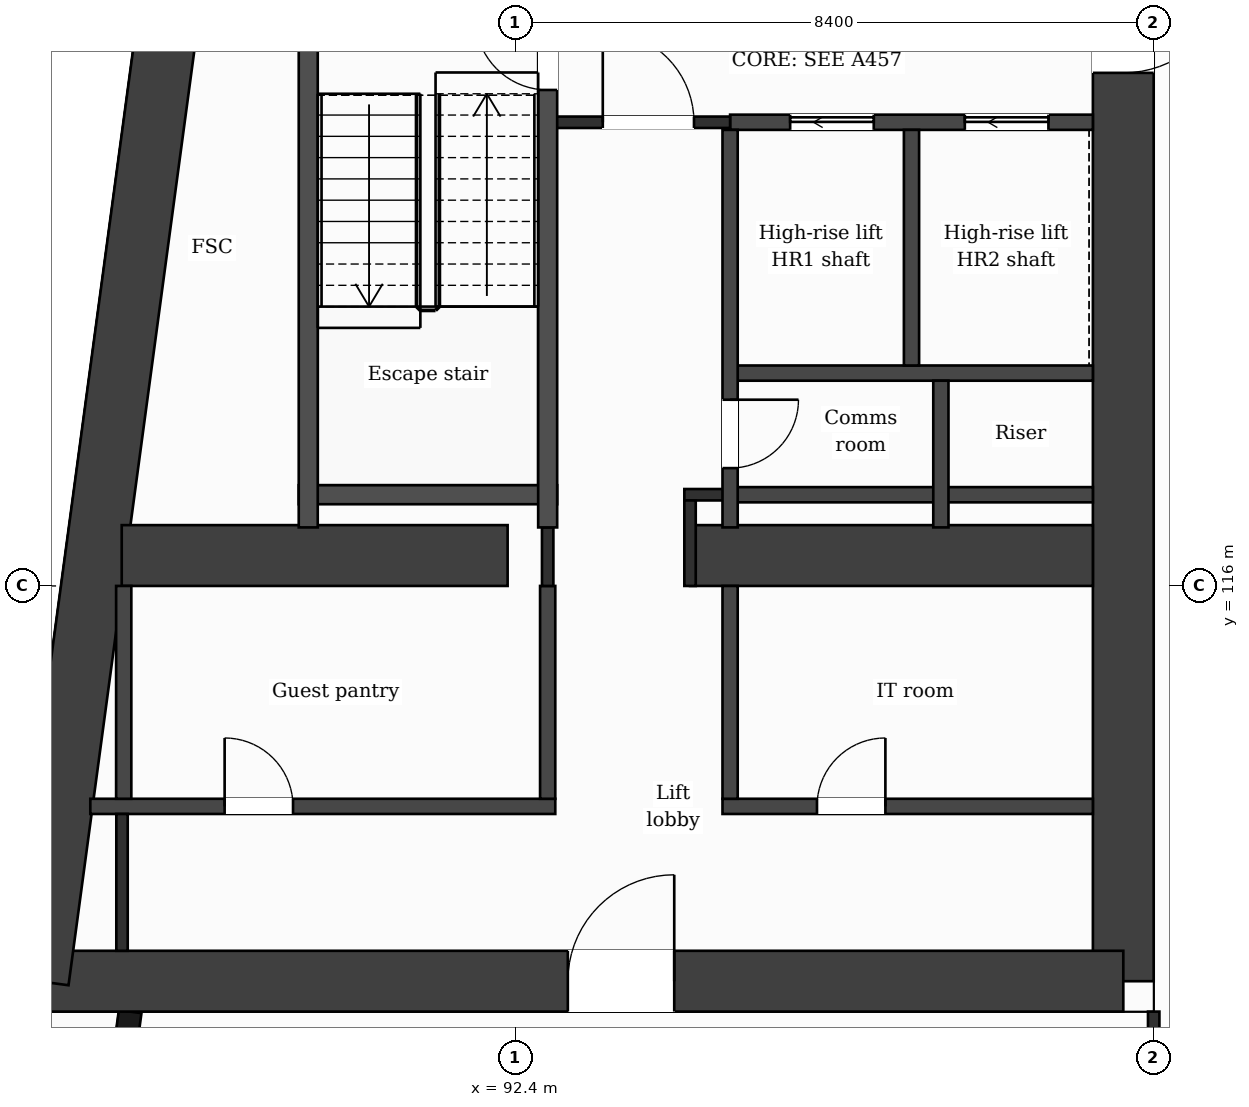
"""IFC4 building model, lengths in metres.
Left out: names, types, materials, properties, quantities, classifications, styles, units other than length and angle.
Written with IfcOpenShell. Run it as: python <this file> out.ifc"""

import sys

from ifc_helpers import new_model, si_unit, direction, frame, frame_2d, origin, place, context, subcontext, project, spatial, rectangle, extrude, element, fill, save


model = new_model("IFC4")
c1 = context("Model", 3, precision=1e-05, world=origin(), true_north=direction((0.0, 1.0)))
c2 = subcontext(c1, "Body", "Model", "MODEL_VIEW")
j1 = project(units=[si_unit("LENGTHUNIT", "METRE"), si_unit("PLANEANGLEUNIT", "RADIAN")], contexts=[c1])
p1 = place(None, origin())
s1 = spatial("IfcSite", under=j1, at=p1, CompositionType="ELEMENT")
p2 = place(p1, origin())
s2 = spatial("IfcBuilding", under=s1, at=p2, CompositionType="ELEMENT")
p3 = place(p2, frame((0.0, 0.0, 231.8)))
s3 = spatial("IfcBuildingStorey", under=s2, at=p3, CompositionType="ELEMENT", Elevation=231.8)
p4 = place(p3, frame((100.4, 132.0, 0.0), z_axis=(0.0, 0.0, 1.0), x_axis=(0.0, -1.0, 0.0)))
e1 = element("IfcWall", 1, at=p4, inside=s3, PredefinedType="SHEAR", context=c2, shape_type="SweptSolid", body=[
    extrude(rectangle(XDim=21.2, YDim=0.8, at=frame_2d((10.6, 0.0))), origin(), (0.0, 0.0, 1.0), 3.7),
])
p5 = place(p4, frame((7.85, 0.0, 0.0)))
e2 = element("IfcOpeningElement", 2, at=p5, cuts=e1, PredefinedType="OPENING", context=c2, shape_type="SweptSolid", body=[
    extrude(rectangle(XDim=1.4, YDim=2.1, at=frame_2d((0.7, 1.05))), frame((0.0, 0.41, 0.0), z_axis=(0.0, -1.0, 0.0), x_axis=(1.0, 0.0, 0.0)), (0.0, 0.0, 1.0), 0.82),
])
p6 = place(p3, frame((100.4, 110.8, 0.0), z_axis=(0.0, 0.0, 1.0), x_axis=(-1.0, 0.0, 0.0)))
e3 = element("IfcWall", 3, at=p6, inside=s3, PredefinedType="SHEAR", context=c2, shape_type="SweptSolid", body=[
    extrude(rectangle(XDim=14.273, YDim=0.8, at=frame_2d((7.137, 0.0))), origin(), (0.0, 0.0, 1.0), 3.7),
])
p7 = place(p6, frame((5.908, 0.0, 0.0)))
e4 = element("IfcOpeningElement", 4, at=p7, cuts=e3, PredefinedType="OPENING", context=c2, shape_type="SweptSolid", body=[
    extrude(rectangle(XDim=1.4, YDim=2.1, at=frame_2d((0.7, 1.05))), frame((0.0, 0.41, 0.0), z_axis=(0.0, -1.0, 0.0), x_axis=(1.0, 0.0, 0.0)), (0.0, 0.0, 1.0), 0.82),
])
p8 = place(p3, frame((86.127, 110.8, 0.0), z_axis=(0.0, 0.0, 1.0), x_axis=(0.133408347329, 0.991061154956, 0.0)))
e5 = element("IfcWall", 5, at=p8, inside=s3, PredefinedType="SHEAR", context=c2, shape_type="SweptSolid", body=[
    extrude(rectangle(XDim=21.391, YDim=0.8, at=frame_2d((10.696, 0.0))), origin(), (0.0, 0.0, 1.0), 3.7),
])
p9 = place(p3, frame((87.223, 116.4, 0.0), z_axis=(0.0, 0.0, 1.0), x_axis=(1.0, 0.0, 0.0)))
e6 = element("IfcWall", 6, at=p9, inside=s3, PredefinedType="SHEAR", context=c2, shape_type="SweptSolid", body=[
    extrude(rectangle(XDim=5.077, YDim=0.8, at=frame_2d((2.539, 0.0))), origin(), (0.0, 0.0, 1.0), 3.7),
])
p10 = place(p3, frame((94.7, 116.4, 0.0), z_axis=(0.0, 0.0, 1.0), x_axis=(1.0, 0.0, 0.0)))
e7 = element("IfcWall", 7, at=p10, inside=s3, PredefinedType="SHEAR", context=c2, shape_type="SweptSolid", body=[
    extrude(rectangle(XDim=5.3, YDim=0.8, at=frame_2d((2.65, 0.0))), origin(), (0.0, 0.0, 1.0), 3.7),
])
p11 = place(p3, frame((87.334, 110.4, 0.0), z_axis=(0.0, 0.0, 1.0), x_axis=(-0.133437175554, -0.991057273915, 0.0)))
e8 = element("IfcWall", 8, at=p11, inside=s3, PredefinedType="SOLIDWALL", context=c2, shape_type="SweptSolid", body=[
    extrude(rectangle(XDim=6.781, YDim=0.3, at=frame_2d((3.39, 0.0))), origin(), (0.0, 0.0, 1.0), 3.38),
])
p12 = place(p11, frame((1.418, 0.0, 0.0)))
e9 = element("IfcOpeningElement", 9, at=p12, cuts=e8, PredefinedType="OPENING", context=c2, shape_type="SweptSolid", body=[
    extrude(rectangle(XDim=1.2, YDim=2.4, at=frame_2d((0.6, 1.2))), frame((0.0, 0.16, 0.0), z_axis=(0.0, -1.0, 0.0), x_axis=(1.0, 0.0, 0.0)), (0.0, 0.0, 1.0), 0.32),
])
p13 = place(p11, frame((4.758, 0.0, 0.9)))
e10 = element("IfcOpeningElement", 10, at=p13, cuts=e8, PredefinedType="OPENING", context=c2, shape_type="SweptSolid", body=[
    extrude(rectangle(XDim=1.2, YDim=2.1, at=frame_2d((0.6, 1.05))), frame((0.0, 0.16, 0.0), z_axis=(0.0, -1.0, 0.0), x_axis=(1.0, 0.0, 0.0)), (0.0, 0.0, 1.0), 0.32),
])
p14 = place(p3, frame((86.81, 113.1, 0.0), z_axis=(0.0, 0.0, 1.0), x_axis=(1.0, 0.0, 0.0)))
e11 = element("IfcWall", 11, at=p14, inside=s3, PredefinedType="PARTITIONING", context=c2, shape_type="SweptSolid", body=[
    extrude(rectangle(XDim=6.117, YDim=0.2, at=frame_2d((3.059, 0.0))), origin(), (0.0, 0.0, 1.0), 3.38),
])
p15 = place(p14, frame((1.767, 0.0, 0.0)))
e12 = element("IfcOpeningElement", 12, at=p15, cuts=e11, PredefinedType="OPENING", context=c2, shape_type="SweptSolid", body=[
    extrude(rectangle(XDim=0.9, YDim=2.1, at=frame_2d((0.45, 1.05))), frame((0.0, 0.11, 0.0), z_axis=(0.0, -1.0, 0.0), x_axis=(1.0, 0.0, 0.0)), (0.0, 0.0, 1.0), 0.22),
])
p16 = place(p3, frame((95.127, 113.1, 0.0), z_axis=(0.0, 0.0, 1.0), x_axis=(1.0, 0.0, 0.0)))
e13 = element("IfcWall", 13, at=p16, inside=s3, PredefinedType="PARTITIONING", context=c2, shape_type="SweptSolid", body=[
    extrude(rectangle(XDim=4.873, YDim=0.2, at=frame_2d((2.437, 0.0))), origin(), (0.0, 0.0, 1.0), 3.38),
])
p17 = place(p16, frame((1.243, 0.0, 0.0)))
e14 = element("IfcOpeningElement", 14, at=p17, cuts=e13, PredefinedType="OPENING", context=c2, shape_type="SweptSolid", body=[
    extrude(rectangle(XDim=0.9, YDim=2.1, at=frame_2d((0.45, 1.05))), frame((0.0, 0.11, 0.0), z_axis=(0.0, -1.0, 0.0), x_axis=(1.0, 0.0, 0.0)), (0.0, 0.0, 1.0), 0.22),
])
p18 = place(p3, frame((95.227, 117.2, 0.0), z_axis=(0.0, 0.0, 1.0), x_axis=(1.0, 0.0, 0.0)))
e15 = element("IfcWall", 15, at=p18, inside=s3, PredefinedType="PARTITIONING", context=c2, shape_type="SweptSolid", body=[
    extrude(rectangle(XDim=4.773, YDim=0.2, at=frame_2d((2.386, 0.0))), origin(), (0.0, 0.0, 1.0), 3.38),
])
p19 = place(p3, frame((94.625, 117.2, 0.0), z_axis=(0.0, 0.0, 1.0), x_axis=(1.0, 0.0, 0.0)))
e16 = element("IfcWall", 16, at=p19, inside=s3, PredefinedType="PARTITIONING", context=c2, shape_type="SweptSolid", body=[
    extrude(rectangle(XDim=0.602, YDim=0.15, at=frame_2d((0.301, 0.0))), origin(), (0.0, 0.0, 1.0), 3.38),
])
p20 = place(p3, frame((89.552, 117.2, 0.0), z_axis=(0.0, 0.0, 1.0), x_axis=(1.0, 0.0, 0.0)))
e17 = element("IfcWall", 17, at=p20, inside=s3, PredefinedType="PARTITIONING", context=c2, shape_type="SweptSolid", body=[
    extrude(rectangle(XDim=3.4, YDim=0.25, at=frame_2d((1.7, 0.0))), origin(), (0.0, 0.0, 1.0), 3.38),
])
p21 = place(p3, frame((95.227, 118.8, 0.0), z_axis=(0.0, 0.0, 1.0), x_axis=(1.0, 0.0, 0.0)))
e18 = element("IfcWall", 18, at=p21, inside=s3, PredefinedType="PARTITIONING", context=c2, shape_type="SweptSolid", body=[
    extrude(rectangle(XDim=4.773, YDim=0.2, at=frame_2d((2.386, 0.0))), origin(), (0.0, 0.0, 1.0), 3.38),
])
p22 = place(p3, frame((95.227, 122.1, 0.0), z_axis=(0.0, 0.0, 1.0), x_axis=(1.0, 0.0, 0.0)))
e19 = element("IfcWall", 19, at=p22, inside=s3, PredefinedType="PARTITIONING", context=c2, shape_type="SweptSolid", body=[
    extrude(rectangle(XDim=4.773, YDim=0.2, at=frame_2d((2.386, 0.0))), origin(), (0.0, 0.0, 1.0), 3.38),
])
p23 = place(p22, frame((0.79, 0.0, 0.0)))
e20 = element("IfcOpeningElement", 20, at=p23, cuts=e19, PredefinedType="OPENING", context=c2, shape_type="SweptSolid", body=[
    extrude(rectangle(XDim=1.1, YDim=2.1, at=frame_2d((0.55, 1.05))), frame((0.0, 0.11, 0.0), z_axis=(0.0, -1.0, 0.0), x_axis=(1.0, 0.0, 0.0)), (0.0, 0.0, 1.0), 0.22),
])
p24 = place(p22, frame((3.088, 0.0, 0.0)))
e21 = element("IfcOpeningElement", 21, at=p24, cuts=e19, PredefinedType="OPENING", context=c2, shape_type="SweptSolid", body=[
    extrude(rectangle(XDim=1.1, YDim=2.1, at=frame_2d((0.55, 1.05))), frame((0.0, 0.11, 0.0), z_axis=(0.0, -1.0, 0.0), x_axis=(1.0, 0.0, 0.0)), (0.0, 0.0, 1.0), 0.22),
])
p25 = place(p3, frame((92.827, 122.1, 0.0), z_axis=(0.0, 0.0, 1.0), x_axis=(1.0, 0.0, 0.0)))
e22 = element("IfcWall", 22, at=p25, inside=s3, PredefinedType="PARTITIONING", context=c2, shape_type="SweptSolid", body=[
    extrude(rectangle(XDim=2.4, YDim=0.15, at=frame_2d((1.2, 0.0))), origin(), (0.0, 0.0, 1.0), 3.38),
])
p26 = place(p25, frame((0.725, 0.0, 0.0)))
e23 = element("IfcOpeningElement", 23, at=p26, cuts=e22, PredefinedType="OPENING", context=c2, shape_type="SweptSolid", body=[
    extrude(rectangle(XDim=1.2, YDim=2.1, at=frame_2d((0.6, 1.05))), frame((0.0, 0.085, 0.0), z_axis=(0.0, -1.0, 0.0), x_axis=(1.0, 0.0, 0.0)), (0.0, 0.0, 1.0), 0.17),
])
p27 = place(p3, frame((87.25, 113.2, 0.0), z_axis=(0.0, 0.0, 1.0), x_axis=(0.0, 1.0, 0.0)))
e24 = element("IfcWall", 24, at=p27, inside=s3, PredefinedType="PARTITIONING", context=c2, shape_type="SweptSolid", body=[
    extrude(rectangle(XDim=2.8, YDim=0.2, at=frame_2d((1.4, 0.0))), origin(), (0.0, 0.0, 1.0), 3.38),
])
p28 = place(p3, frame((87.227, 111.2, 0.0), z_axis=(0.0, 0.0, 1.0), x_axis=(0.0, 1.0, 0.0)))
e25 = element("IfcWall", 25, at=p28, inside=s3, PredefinedType="PARTITIONING", context=c2, shape_type="SweptSolid", body=[
    extrude(rectangle(XDim=1.8, YDim=0.15, at=frame_2d((0.9, 0.0))), origin(), (0.0, 0.0, 1.0), 3.38),
])
p29 = place(p3, frame((89.677, 116.77, 0.0), z_axis=(0.0, 0.0, 1.0), x_axis=(0.0, 1.0, 0.0)))
e26 = element("IfcWall", 26, at=p29, inside=s3, PredefinedType="PARTITIONING", context=c2, shape_type="SweptSolid", body=[
    extrude(rectangle(XDim=7.055, YDim=0.25, at=frame_2d((3.527, 0.0))), origin(), (0.0, 0.0, 1.0), 3.38),
])
p30 = place(p3, frame((92.827, 113.2, 0.0), z_axis=(0.0, 0.0, 1.0), x_axis=(0.0, 1.0, 0.0)))
e27 = element("IfcWall", 27, at=p30, inside=s3, PredefinedType="PARTITIONING", context=c2, shape_type="SweptSolid", body=[
    extrude(rectangle(XDim=2.8, YDim=0.2, at=frame_2d((1.4, 0.0))), origin(), (0.0, 0.0, 1.0), 3.38),
])
p31 = place(p3, frame((92.827, 116.0, 0.0), z_axis=(0.0, 0.0, 1.0), x_axis=(0.0, 1.0, 0.0)))
e28 = element("IfcWall", 28, at=p31, inside=s3, PredefinedType="PARTITIONING", context=c2, shape_type="SweptSolid", body=[
    extrude(rectangle(XDim=0.77, YDim=0.15, at=frame_2d((0.385, 0.0))), origin(), (0.0, 0.0, 1.0), 3.38),
])
p32 = place(p3, frame((92.827, 116.77, 0.0), z_axis=(0.0, 0.0, 1.0), x_axis=(0.0, 1.0, 0.0)))
e29 = element("IfcWall", 29, at=p32, inside=s3, PredefinedType="PARTITIONING", context=c2, shape_type="SweptSolid", body=[
    extrude(rectangle(XDim=7.055, YDim=0.25, at=frame_2d((3.527, 0.0))), origin(), (0.0, 0.0, 1.0), 3.38),
])
p33 = place(p32, frame((5.755, 0.0, 0.0)))
e30 = element("IfcOpeningElement", 30, at=p33, cuts=e29, PredefinedType="OPENING", context=c2, shape_type="SweptSolid", body=[
    extrude(rectangle(XDim=0.95, YDim=2.1, at=frame_2d((0.475, 1.05))), frame((0.0, 0.135, 0.0), z_axis=(0.0, -1.0, 0.0), x_axis=(1.0, 0.0, 0.0)), (0.0, 0.0, 1.0), 0.27),
])
p34 = place(p3, frame((94.7, 116.0, 0.0), z_axis=(0.0, 0.0, 1.0), x_axis=(0.0, 1.0, 0.0)))
e31 = element("IfcWall", 31, at=p34, inside=s3, PredefinedType="PARTITIONING", context=c2, shape_type="SweptSolid", body=[
    extrude(rectangle(XDim=1.125, YDim=0.15, at=frame_2d((0.562, 0.0))), origin(), (0.0, 0.0, 1.0), 3.38),
])
p35 = place(p3, frame((95.227, 113.2, 0.0), z_axis=(0.0, 0.0, 1.0), x_axis=(0.0, 1.0, 0.0)))
e32 = element("IfcWall", 32, at=p35, inside=s3, PredefinedType="PARTITIONING", context=c2, shape_type="SweptSolid", body=[
    extrude(rectangle(XDim=2.8, YDim=0.2, at=frame_2d((1.4, 0.0))), origin(), (0.0, 0.0, 1.0), 3.38),
])
p36 = place(p3, frame((95.227, 116.77, 0.0), z_axis=(0.0, 0.0, 1.0), x_axis=(0.0, 1.0, 0.0)))
e33 = element("IfcWall", 33, at=p36, inside=s3, PredefinedType="PARTITIONING", context=c2, shape_type="SweptSolid", body=[
    extrude(rectangle(XDim=5.23, YDim=0.2, at=frame_2d((2.615, 0.0))), origin(), (0.0, 0.0, 1.0), 3.38),
])
p37 = place(p36, frame((0.78, 0.0, 0.0)))
e34 = element("IfcOpeningElement", 34, at=p37, cuts=e33, PredefinedType="OPENING", context=c2, shape_type="SweptSolid", body=[
    extrude(rectangle(XDim=0.9, YDim=2.1, at=frame_2d((0.45, 1.05))), frame((0.0, 0.11, 0.0), z_axis=(0.0, -1.0, 0.0), x_axis=(1.0, 0.0, 0.0)), (0.0, 0.0, 1.0), 0.22),
])
p38 = place(p3, frame((97.614, 118.9, 0.0), z_axis=(0.0, 0.0, 1.0), x_axis=(0.0, 1.0, 0.0)))
e35 = element("IfcWall", 35, at=p38, inside=s3, PredefinedType="PARTITIONING", context=c2, shape_type="SweptSolid", body=[
    extrude(rectangle(XDim=3.1, YDim=0.2, at=frame_2d((1.55, 0.0))), origin(), (0.0, 0.0, 1.0), 3.38),
])
p39 = place(p3, frame((98.0, 116.77, 0.0), z_axis=(0.0, 0.0, 1.0), x_axis=(0.0, 1.0, 0.0)))
e36 = element("IfcWall", 36, at=p39, inside=s3, PredefinedType="PARTITIONING", context=c2, shape_type="SweptSolid", body=[
    extrude(rectangle(XDim=1.93, YDim=0.2, at=frame_2d((0.965, 0.0))), origin(), (0.0, 0.0, 1.0), 3.38),
])
p40 = place(p3, frame((100.8, 109.075, 0.0), z_axis=(0.0, 0.0, 1.0), x_axis=(0.0, 1.0, 0.0)))
e37 = element("IfcWall", 37, at=p40, inside=s3, PredefinedType="PARTITIONING", context=c2, shape_type="SweptSolid", body=[
    extrude(rectangle(XDim=1.325, YDim=0.15, at=frame_2d((0.663, 0.0))), origin(), (0.0, 0.0, 1.0), 3.38),
])
p41 = place(p26, origin())
e38 = element("IfcDoor", 38, at=p41, inside=s3, OperationType="SINGLE_SWING_LEFT", PredefinedType="DOOR", context=c2, shape_type="SweptSolid", body=[
    extrude(rectangle(XDim=1.2, YDim=2.1, at=frame_2d((0.6, 1.05))), frame((0.0, 0.025, 0.0), z_axis=(0.0, -1.0, 0.0), x_axis=(1.0, 0.0, 0.0)), (0.0, 0.0, 1.0), 0.05),
])
fill(e23, e38)
p42 = place(p23, origin())
e39 = element("IfcDoor", 39, at=p42, inside=s3, OperationType="SLIDING_TO_LEFT", PredefinedType="DOOR", context=c2, shape_type="SweptSolid", body=[
    extrude(rectangle(XDim=1.1, YDim=2.1, at=frame_2d((0.55, 1.05))), frame((0.0, 0.025, 0.0), z_axis=(0.0, -1.0, 0.0), x_axis=(1.0, 0.0, 0.0)), (0.0, 0.0, 1.0), 0.05),
])
fill(e20, e39)
p43 = place(p24, origin())
e40 = element("IfcDoor", 40, at=p43, inside=s3, OperationType="SLIDING_TO_LEFT", PredefinedType="DOOR", context=c2, shape_type="SweptSolid", body=[
    extrude(rectangle(XDim=1.1, YDim=2.1, at=frame_2d((0.55, 1.05))), frame((0.0, 0.025, 0.0), z_axis=(0.0, -1.0, 0.0), x_axis=(1.0, 0.0, 0.0)), (0.0, 0.0, 1.0), 0.05),
])
fill(e21, e40)
p44 = place(p33, origin())
e41 = element("IfcDoor", 41, at=p44, inside=s3, OperationType="SINGLE_SWING_RIGHT", PredefinedType="DOOR", context=c2, shape_type="SweptSolid", body=[
    extrude(rectangle(XDim=0.95, YDim=2.1, at=frame_2d((0.475, 1.05))), frame((0.0, 0.025, 0.0), z_axis=(0.0, -1.0, 0.0), x_axis=(1.0, 0.0, 0.0)), (0.0, 0.0, 1.0), 0.05),
])
fill(e30, e41)
p45 = place(p37, origin())
e42 = element("IfcDoor", 42, at=p45, inside=s3, OperationType="SINGLE_SWING_RIGHT", PredefinedType="DOOR", context=c2, shape_type="SweptSolid", body=[
    extrude(rectangle(XDim=0.9, YDim=2.1, at=frame_2d((0.45, 1.05))), frame((0.0, 0.025, 0.0), z_axis=(0.0, -1.0, 0.0), x_axis=(1.0, 0.0, 0.0)), (0.0, 0.0, 1.0), 0.05),
])
fill(e34, e42)
p46 = place(p15, origin())
e43 = element("IfcDoor", 43, at=p46, inside=s3, OperationType="SINGLE_SWING_LEFT", PredefinedType="DOOR", context=c2, shape_type="SweptSolid", body=[
    extrude(rectangle(XDim=0.9, YDim=2.1, at=frame_2d((0.45, 1.05))), frame((0.0, 0.025, 0.0), z_axis=(0.0, -1.0, 0.0), x_axis=(1.0, 0.0, 0.0)), (0.0, 0.0, 1.0), 0.05),
])
fill(e12, e43)
p47 = place(p17, origin())
e44 = element("IfcDoor", 44, at=p47, inside=s3, OperationType="SINGLE_SWING_RIGHT", PredefinedType="DOOR", context=c2, shape_type="SweptSolid", body=[
    extrude(rectangle(XDim=0.9, YDim=2.1, at=frame_2d((0.45, 1.05))), frame((0.0, 0.025, 0.0), z_axis=(0.0, -1.0, 0.0), x_axis=(1.0, 0.0, 0.0)), (0.0, 0.0, 1.0), 0.05),
])
fill(e14, e44)
p48 = place(p7, origin())
e45 = element("IfcDoor", 45, at=p48, inside=s3, OperationType="SINGLE_SWING_LEFT", PredefinedType="DOOR", context=c2, shape_type="SweptSolid", body=[
    extrude(rectangle(XDim=1.4, YDim=2.1, at=frame_2d((0.7, 1.05))), frame((0.0, 0.025, 0.0), z_axis=(0.0, -1.0, 0.0), x_axis=(1.0, 0.0, 0.0)), (0.0, 0.0, 1.0), 0.05),
])
fill(e4, e45)
p49 = place(p5, origin())
e46 = element("IfcDoor", 46, at=p49, inside=s3, OperationType="SINGLE_SWING_LEFT", PredefinedType="DOOR", context=c2, shape_type="SweptSolid", body=[
    extrude(rectangle(XDim=1.4, YDim=2.1, at=frame_2d((0.7, 1.05))), frame((0.0, 0.025, 0.0), z_axis=(0.0, -1.0, 0.0), x_axis=(1.0, 0.0, 0.0)), (0.0, 0.0, 1.0), 0.05),
])
fill(e2, e46)
save(model, sys.argv[1])
